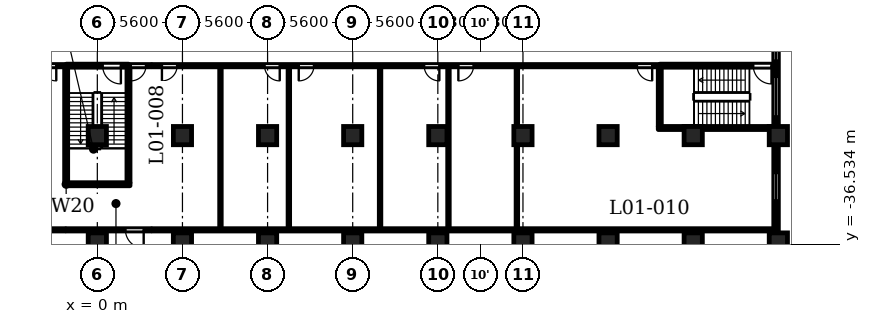
"""IFC4 building model, lengths in metres.
Left out: names, types, materials, properties, quantities, classifications, styles, units other than length and angle.
Written with IfcOpenShell. Run it as: python <this file> out.ifc"""

import sys

from ifc_helpers import new_model, si_unit, direction, frame, frame_2d, origin, origin_2d, place, context, subcontext, project, spatial, rectangle, circle, extrude, element, fill, save


model = new_model("IFC4")
c1 = context("Model", 3, precision=1e-05, world=origin(), true_north=direction((0.0, 1.0)))
c2 = subcontext(c1, "Body", "Model", "MODEL_VIEW")
j1 = project(units=[si_unit("LENGTHUNIT", "METRE"), si_unit("PLANEANGLEUNIT", "RADIAN")], contexts=[c1])
p1 = place(None, origin())
s1 = spatial("IfcSite", under=j1, at=p1, CompositionType="ELEMENT")
p2 = place(p1, origin())
s2 = spatial("IfcBuilding", under=s1, at=p2, CompositionType="ELEMENT")
p3 = place(p2, frame((0.0, 0.0, 6.5)))
s3 = spatial("IfcBuildingStorey", under=s2, at=p3, CompositionType="ELEMENT", Elevation=6.5)
for number, where, z_axis, x_axis in (
    (1, (0.0, -29.4, 0.0), (0.0, 0.0, 1.0), (1.0, 0.0, 0.0)),
    (2, (5.6, -29.4, 0.0), (0.0, 0.0, 1.0), (1.0, 0.0, 0.0)),
    (3, (11.2, -29.4, 0.0), (0.0, 0.0, 1.0), (1.0, 0.0, 0.0)),
    (4, (16.8, -29.4, 0.0), (0.0, 0.0, 1.0), (1.0, 0.0, 0.0)),
    (5, (22.4, -29.4, 0.0), (0.0, 0.0, 1.0), (1.0, 0.0, 0.0)),
    (6, (28.0, -29.4, 0.0), (0.0, 0.0, 1.0), (1.0, 0.0, 0.0)),
    (7, (33.6, -29.4, 0.0), (0.0, 0.0, 1.0), (1.0, 0.0, 0.0)),
    (8, (39.2, -29.4, 0.0), (0.0, 0.0, 1.0), (1.0, 0.0, 0.0)),
    (9, (44.8, -29.4, 0.0), (0.0, 0.0, 1.0), (1.0, 0.0, 0.0)),
    (10, (0.0, -36.4, 0.0), (0.0, 0.0, 1.0), (1.0, 0.0, 0.0)),
    (11, (5.6, -36.4, 0.0), (0.0, 0.0, 1.0), (1.0, 0.0, 0.0)),
    (12, (11.2, -36.4, 0.0), (0.0, 0.0, 1.0), (1.0, 0.0, 0.0)),
    (13, (16.8, -36.4, 0.0), (0.0, 0.0, 1.0), (1.0, 0.0, 0.0)),
    (14, (22.4, -36.4, 0.0), (0.0, 0.0, 1.0), (1.0, 0.0, 0.0)),
    (15, (28.0, -36.4, 0.0), (0.0, 0.0, 1.0), (1.0, 0.0, 0.0)),
    (16, (33.6, -36.4, 0.0), (0.0, 0.0, 1.0), (1.0, 0.0, 0.0)),
    (17, (39.2, -36.4, 0.0), (0.0, 0.0, 1.0), (1.0, 0.0, 0.0)),
    (18, (44.8, -36.4, 0.0), (0.0, 0.0, 1.0), (1.0, 0.0, 0.0)),
):
    element("IfcColumn", number, at=place(p3, frame(where, z_axis=z_axis, x_axis=x_axis)), inside=s3, PredefinedType="COLUMN", context=c2, shape_type="SweptSolid", body=[
        extrude(circle(Radius=0.6, at=origin_2d()), origin(), (0.0, 0.0, 1.0), 4.8),
    ])
p4 = place(p3, frame((44.65, -35.8, 0.0), z_axis=(0.0, 0.0, 1.0), x_axis=(0.0, 1.0, 0.0)))
e19 = element("IfcWall", 19, at=p4, inside=s3, PredefinedType="SOLIDWALL", context=c2, shape_type="SweptSolid", body=[
    extrude(rectangle(XDim=5.8, YDim=0.3, at=frame_2d((2.9, 0.0))), origin(), (0.0, 0.0, 1.0), 3.65),
])
p5 = place(p4, frame((2.137, 0.0, 0.9)))
e20 = element("IfcOpeningElement", 20, at=p5, cuts=e19, PredefinedType="OPENING", context=c2, shape_type="SweptSolid", body=[
    extrude(rectangle(XDim=1.8, YDim=1.25, at=frame_2d((0.9, 0.625))), frame((0.0, 0.16, 0.0), z_axis=(0.0, -1.0, 0.0), x_axis=(1.0, 0.0, 0.0)), (0.0, 0.0, 1.0), 0.32),
])
p6 = place(p3, frame((44.65, -28.8, 0.0), z_axis=(0.0, 0.0, 1.0), x_axis=(0.0, 1.0, 0.0)))
e21 = element("IfcWall", 21, at=p6, inside=s3, PredefinedType="SOLIDWALL", context=c2, shape_type="SweptSolid", body=[
    extrude(rectangle(XDim=5.8, YDim=0.3, at=frame_2d((2.9, 0.0))), origin(), (0.0, 0.0, 1.0), 3.65),
])
p7 = place(p6, frame((0.663, 0.0, 0.9)))
e22 = element("IfcOpeningElement", 22, at=p7, cuts=e21, PredefinedType="OPENING", context=c2, shape_type="SweptSolid", body=[
    extrude(rectangle(XDim=2.6, YDim=1.25, at=frame_2d((1.3, 0.625))), frame((0.0, 0.16, 0.0), z_axis=(0.0, -1.0, 0.0), x_axis=(1.0, 0.0, 0.0)), (0.0, 0.0, 1.0), 0.32),
])
p8 = place(p6, frame((4.337, 0.0, 0.6)))
e23 = element("IfcOpeningElement", 23, at=p8, cuts=e21, PredefinedType="OPENING", context=c2, shape_type="SweptSolid", body=[
    extrude(rectangle(XDim=1.2, YDim=1.55, at=frame_2d((0.6, 0.775))), frame((0.0, 0.16, 0.0), z_axis=(0.0, -1.0, 0.0), x_axis=(1.0, 0.0, 0.0)), (0.0, 0.0, 1.0), 0.32),
])
p9 = place(p3, frame((-44.48, -35.6, 0.0), z_axis=(0.0, 0.0, 1.0), x_axis=(1.0, 0.0, 0.0)))
e24 = element("IfcWall", 24, at=p9, inside=s3, PredefinedType="PARTITIONING", context=c2, shape_type="SweptSolid", body=[
    extrude(rectangle(XDim=42.38, YDim=0.15, at=frame_2d((21.19, 0.0))), origin(), (0.0, 0.0, 1.0), 4.45),
])
p10 = place(p3, frame((-2.05, -35.6, 0.0), z_axis=(0.0, 0.0, 1.0), x_axis=(1.0, 0.0, 0.0)))
e25 = element("IfcWall", 25, at=p10, inside=s3, PredefinedType="PARTITIONING", context=c2, shape_type="SweptSolid", body=[
    extrude(rectangle(XDim=5.6, YDim=0.15, at=frame_2d((2.8, 0.0))), origin(), (0.0, 0.0, 1.0), 4.45),
])
p11 = place(p10, frame((3.9, 0.0, 0.0)))
e26 = element("IfcOpeningElement", 26, at=p11, cuts=e25, PredefinedType="OPENING", context=c2, shape_type="SweptSolid", body=[
    extrude(rectangle(XDim=1.2, YDim=2.1, at=frame_2d((0.6, 1.05))), frame((0.0, 0.085, 0.0), z_axis=(0.0, -1.0, 0.0), x_axis=(1.0, 0.0, 0.0)), (0.0, 0.0, 1.0), 0.17),
])
p12 = place(p3, frame((3.6, -35.6, 0.0), z_axis=(0.0, 0.0, 1.0), x_axis=(1.0, 0.0, 0.0)))
e27 = element("IfcWall", 27, at=p12, inside=s3, PredefinedType="PARTITIONING", context=c2, shape_type="SweptSolid", body=[
    extrude(rectangle(XDim=40.88, YDim=0.15, at=frame_2d((20.44, 0.0))), origin(), (0.0, 0.0, 1.0), 4.45),
])
p13 = place(p3, frame((-2.05, -32.6, 0.0), z_axis=(0.0, 0.0, 1.0), x_axis=(1.0, 0.0, 0.0)))
e28 = element("IfcWall", 28, at=p13, inside=s3, PredefinedType="SHEAR", context=c2, shape_type="SweptSolid", body=[
    extrude(rectangle(XDim=4.2, YDim=0.2, at=frame_2d((2.1, 0.0))), origin(), (0.0, 0.0, 1.0), 4.45),
])
p14 = place(p3, frame((36.9, -28.9, 0.0), z_axis=(0.0, 0.0, 1.0), x_axis=(1.0, 0.0, 0.0)))
e29 = element("IfcWall", 29, at=p14, inside=s3, PredefinedType="SHEAR", context=c2, shape_type="SweptSolid", body=[
    extrude(rectangle(XDim=7.81, YDim=0.2, at=frame_2d((3.905, 0.0))), origin(), (0.0, 0.0, 1.0), 4.45),
])
p15 = place(p3, frame((-37.0, -24.8, 0.0), z_axis=(0.0, 0.0, 1.0), x_axis=(1.0, 0.0, 0.0)))
e30 = element("IfcWall", 30, at=p15, inside=s3, PredefinedType="PARTITIONING", context=c2, shape_type="SweptSolid", body=[
    extrude(rectangle(XDim=34.9, YDim=0.15, at=frame_2d((17.45, 0.0))), origin(), (0.0, 0.0, 1.0), 4.45),
])
p16 = place(p15, frame((0.65, 0.0, 0.0)))
e31 = element("IfcOpeningElement", 31, at=p16, cuts=e30, PredefinedType="OPENING", context=c2, shape_type="SweptSolid", body=[
    extrude(rectangle(XDim=1.0, YDim=2.1, at=frame_2d((0.5, 1.05))), frame((0.0, 0.085, 0.0), z_axis=(0.0, -1.0, 0.0), x_axis=(1.0, 0.0, 0.0)), (0.0, 0.0, 1.0), 0.17),
])
p17 = place(p15, frame((5.8, 0.0, 0.0)))
e32 = element("IfcOpeningElement", 32, at=p17, cuts=e30, PredefinedType="OPENING", context=c2, shape_type="SweptSolid", body=[
    extrude(rectangle(XDim=1.0, YDim=2.1, at=frame_2d((0.5, 1.05))), frame((0.0, 0.085, 0.0), z_axis=(0.0, -1.0, 0.0), x_axis=(1.0, 0.0, 0.0)), (0.0, 0.0, 1.0), 0.17),
])
p18 = place(p15, frame((8.05, 0.0, 0.0)))
e33 = element("IfcOpeningElement", 33, at=p18, cuts=e30, PredefinedType="OPENING", context=c2, shape_type="SweptSolid", body=[
    extrude(rectangle(XDim=1.0, YDim=2.1, at=frame_2d((0.5, 1.05))), frame((0.0, 0.085, 0.0), z_axis=(0.0, -1.0, 0.0), x_axis=(1.0, 0.0, 0.0)), (0.0, 0.0, 1.0), 0.17),
])
p19 = place(p15, frame((13.8, 0.0, 0.0)))
e34 = element("IfcOpeningElement", 34, at=p19, cuts=e30, PredefinedType="OPENING", context=c2, shape_type="SweptSolid", body=[
    extrude(rectangle(XDim=1.0, YDim=2.1, at=frame_2d((0.5, 1.05))), frame((0.0, 0.085, 0.0), z_axis=(0.0, -1.0, 0.0), x_axis=(1.0, 0.0, 0.0)), (0.0, 0.0, 1.0), 0.17),
])
p20 = place(p15, frame((16.05, 0.0, 0.0)))
e35 = element("IfcOpeningElement", 35, at=p20, cuts=e30, PredefinedType="OPENING", context=c2, shape_type="SweptSolid", body=[
    extrude(rectangle(XDim=1.0, YDim=2.1, at=frame_2d((0.5, 1.05))), frame((0.0, 0.085, 0.0), z_axis=(0.0, -1.0, 0.0), x_axis=(1.0, 0.0, 0.0)), (0.0, 0.0, 1.0), 0.17),
])
p21 = place(p15, frame((33.3, 0.0, 0.0)))
e36 = element("IfcOpeningElement", 36, at=p21, cuts=e30, PredefinedType="OPENING", context=c2, shape_type="SweptSolid", body=[
    extrude(rectangle(XDim=1.0, YDim=2.1, at=frame_2d((0.5, 1.05))), frame((0.0, 0.085, 0.0), z_axis=(0.0, -1.0, 0.0), x_axis=(1.0, 0.0, 0.0)), (0.0, 0.0, 1.0), 0.17),
])
p22 = place(p3, frame((2.05, -24.8, 0.0), z_axis=(0.0, 0.0, 1.0), x_axis=(1.0, 0.0, 0.0)))
e37 = element("IfcWall", 37, at=p22, inside=s3, PredefinedType="PARTITIONING", context=c2, shape_type="SweptSolid", body=[
    extrude(rectangle(XDim=1.5, YDim=0.15, at=frame_2d((0.75, 0.0))), origin(), (0.0, 0.0, 1.0), 4.45),
])
p23 = place(p22, frame((0.15, 0.0, 0.0)))
e38 = element("IfcOpeningElement", 38, at=p23, cuts=e37, PredefinedType="OPENING", context=c2, shape_type="SweptSolid", body=[
    extrude(rectangle(XDim=1.0, YDim=2.1, at=frame_2d((0.5, 1.05))), frame((0.0, 0.085, 0.0), z_axis=(0.0, -1.0, 0.0), x_axis=(1.0, 0.0, 0.0)), (0.0, 0.0, 1.0), 0.17),
])
p24 = place(p3, frame((3.6, -24.8, 0.0), z_axis=(0.0, 0.0, 1.0), x_axis=(1.0, 0.0, 0.0)))
e39 = element("IfcWall", 39, at=p24, inside=s3, PredefinedType="PARTITIONING", context=c2, shape_type="SweptSolid", body=[
    extrude(rectangle(XDim=33.4, YDim=0.15, at=frame_2d((16.7, 0.0))), origin(), (0.0, 0.0, 1.0), 4.45),
])
p25 = place(p24, frame((0.65, 0.0, 0.0)))
e40 = element("IfcOpeningElement", 40, at=p25, cuts=e39, PredefinedType="OPENING", context=c2, shape_type="SweptSolid", body=[
    extrude(rectangle(XDim=1.0, YDim=2.1, at=frame_2d((0.5, 1.05))), frame((0.0, 0.085, 0.0), z_axis=(0.0, -1.0, 0.0), x_axis=(1.0, 0.0, 0.0)), (0.0, 0.0, 1.0), 0.17),
])
p26 = place(p24, frame((7.4, 0.0, 0.0)))
e41 = element("IfcOpeningElement", 41, at=p26, cuts=e39, PredefinedType="OPENING", context=c2, shape_type="SweptSolid", body=[
    extrude(rectangle(XDim=1.0, YDim=2.1, at=frame_2d((0.5, 1.05))), frame((0.0, 0.085, 0.0), z_axis=(0.0, -1.0, 0.0), x_axis=(1.0, 0.0, 0.0)), (0.0, 0.0, 1.0), 0.17),
])
p27 = place(p24, frame((9.65, 0.0, 0.0)))
e42 = element("IfcOpeningElement", 42, at=p27, cuts=e39, PredefinedType="OPENING", context=c2, shape_type="SweptSolid", body=[
    extrude(rectangle(XDim=1.0, YDim=2.1, at=frame_2d((0.5, 1.05))), frame((0.0, 0.085, 0.0), z_axis=(0.0, -1.0, 0.0), x_axis=(1.0, 0.0, 0.0)), (0.0, 0.0, 1.0), 0.17),
])
p28 = place(p24, frame((17.9, 0.0, 0.0)))
e43 = element("IfcOpeningElement", 43, at=p28, cuts=e39, PredefinedType="OPENING", context=c2, shape_type="SweptSolid", body=[
    extrude(rectangle(XDim=1.0, YDim=2.1, at=frame_2d((0.5, 1.05))), frame((0.0, 0.085, 0.0), z_axis=(0.0, -1.0, 0.0), x_axis=(1.0, 0.0, 0.0)), (0.0, 0.0, 1.0), 0.17),
])
p29 = place(p24, frame((20.15, 0.0, 0.0)))
e44 = element("IfcOpeningElement", 44, at=p29, cuts=e39, PredefinedType="OPENING", context=c2, shape_type="SweptSolid", body=[
    extrude(rectangle(XDim=1.0, YDim=2.1, at=frame_2d((0.5, 1.05))), frame((0.0, 0.085, 0.0), z_axis=(0.0, -1.0, 0.0), x_axis=(1.0, 0.0, 0.0)), (0.0, 0.0, 1.0), 0.17),
])
p30 = place(p24, frame((31.9, 0.0, 0.0)))
e45 = element("IfcOpeningElement", 45, at=p30, cuts=e39, PredefinedType="OPENING", context=c2, shape_type="SweptSolid", body=[
    extrude(rectangle(XDim=1.0, YDim=2.1, at=frame_2d((0.5, 1.05))), frame((0.0, 0.085, 0.0), z_axis=(0.0, -1.0, 0.0), x_axis=(1.0, 0.0, 0.0)), (0.0, 0.0, 1.0), 0.17),
])
p31 = place(p3, frame((-2.05, -24.8, 0.0), z_axis=(0.0, 0.0, 1.0), x_axis=(1.0, 0.0, 0.0)))
e46 = element("IfcWall", 46, at=p31, inside=s3, PredefinedType="SHEAR", context=c2, shape_type="SweptSolid", body=[
    extrude(rectangle(XDim=4.1, YDim=0.2, at=frame_2d((2.05, 0.0))), origin(), (0.0, 0.0, 1.0), 4.45),
])
p32 = place(p31, frame((2.4, 0.0, 0.0)))
e47 = element("IfcOpeningElement", 47, at=p32, cuts=e46, PredefinedType="OPENING", context=c2, shape_type="SweptSolid", body=[
    extrude(rectangle(XDim=1.2, YDim=2.1, at=frame_2d((0.6, 1.05))), frame((0.0, 0.11, 0.0), z_axis=(0.0, -1.0, 0.0), x_axis=(1.0, 0.0, 0.0)), (0.0, 0.0, 1.0), 0.22),
])
p33 = place(p3, frame((37.0, -24.8, 0.0), z_axis=(0.0, 0.0, 1.0), x_axis=(1.0, 0.0, 0.0)))
e48 = element("IfcWall", 48, at=p33, inside=s3, PredefinedType="SHEAR", context=c2, shape_type="SweptSolid", body=[
    extrude(rectangle(XDim=7.71, YDim=0.2, at=frame_2d((3.855, 0.0))), origin(), (0.0, 0.0, 1.0), 4.45),
])
p34 = place(p33, frame((6.15, 0.0, 0.0)))
e49 = element("IfcOpeningElement", 49, at=p34, cuts=e48, PredefinedType="OPENING", context=c2, shape_type="SweptSolid", body=[
    extrude(rectangle(XDim=1.2, YDim=2.1, at=frame_2d((0.6, 1.05))), frame((0.0, 0.11, 0.0), z_axis=(0.0, -1.0, 0.0), x_axis=(1.0, 0.0, 0.0)), (0.0, 0.0, 1.0), 0.22),
])
p35 = place(p3, frame((2.05, -32.5, 0.0), z_axis=(0.0, 0.0, 1.0), x_axis=(0.0, 1.0, 0.0)))
e50 = element("IfcWall", 50, at=p35, inside=s3, PredefinedType="SHEAR", context=c2, shape_type="SweptSolid", body=[
    extrude(rectangle(XDim=7.625, YDim=0.2, at=frame_2d((3.812, 0.0))), origin(), (0.0, 0.0, 1.0), 4.45),
])
for number, where, z_axis, x_axis in (
    (51, (8.1, -35.525, 0.0), (0.0, 0.0, 1.0), (0.0, 1.0, 0.0)),
    (52, (12.6, -35.525, 0.0), (0.0, 0.0, 1.0), (0.0, 1.0, 0.0)),
    (53, (18.6, -35.525, 0.0), (0.0, 0.0, 1.0), (0.0, 1.0, 0.0)),
    (54, (23.1, -35.525, 0.0), (0.0, 0.0, 1.0), (0.0, 1.0, 0.0)),
    (55, (27.6, -35.525, 0.0), (0.0, 0.0, 1.0), (0.0, 1.0, 0.0)),
):
    element("IfcWall", number, at=place(p3, frame(where, z_axis=z_axis, x_axis=x_axis)), inside=s3, PredefinedType="PARTITIONING", context=c2, shape_type="SweptSolid", body=[
        extrude(rectangle(XDim=10.65, YDim=0.1, at=frame_2d((5.325, 0.0))), origin(), (0.0, 0.0, 1.0), 4.45),
    ])
p36 = place(p3, frame((37.0, -28.8, 0.0), z_axis=(0.0, 0.0, 1.0), x_axis=(0.0, 1.0, 0.0)))
e56 = element("IfcWall", 56, at=p36, inside=s3, PredefinedType="SHEAR", context=c2, shape_type="SweptSolid", body=[
    extrude(rectangle(XDim=3.925, YDim=0.2, at=frame_2d((1.962, 0.0))), origin(), (0.0, 0.0, 1.0), 4.45),
])
p37 = place(p3, frame((-2.05, -32.5, 0.0), z_axis=(0.0, 0.0, 1.0), x_axis=(0.0, 1.0, 0.0)))
e57 = element("IfcWall", 57, at=p37, inside=s3, PredefinedType="SHEAR", context=c2, shape_type="SweptSolid", body=[
    extrude(rectangle(XDim=7.6, YDim=0.2, at=frame_2d((3.8, 0.0))), origin(), (0.0, 0.0, 1.0), 4.45),
])
p38 = place(p34, origin())
e58 = element("IfcDoor", 58, at=p38, inside=s3, OperationType="SINGLE_SWING_RIGHT", PredefinedType="DOOR", context=c2, shape_type="SweptSolid", body=[
    extrude(rectangle(XDim=1.2, YDim=2.1, at=frame_2d((0.6, 1.05))), frame((0.0, 0.025, 0.0), z_axis=(0.0, -1.0, 0.0), x_axis=(1.0, 0.0, 0.0)), (0.0, 0.0, 1.0), 0.05),
])
fill(e49, e58)
p39 = place(p32, origin())
e59 = element("IfcDoor", 59, at=p39, inside=s3, OperationType="SINGLE_SWING_RIGHT", PredefinedType="DOOR", context=c2, shape_type="SweptSolid", body=[
    extrude(rectangle(XDim=1.2, YDim=2.1, at=frame_2d((0.6, 1.05))), frame((0.0, 0.025, 0.0), z_axis=(0.0, -1.0, 0.0), x_axis=(1.0, 0.0, 0.0)), (0.0, 0.0, 1.0), 0.05),
])
fill(e47, e59)
p40 = place(p23, origin())
e60 = element("IfcDoor", 60, at=p40, inside=s3, OperationType="SINGLE_SWING_LEFT", PredefinedType="DOOR", context=c2, shape_type="SweptSolid", body=[
    extrude(rectangle(XDim=1.0, YDim=2.1, at=frame_2d((0.5, 1.05))), frame((0.0, 0.025, 0.0), z_axis=(0.0, -1.0, 0.0), x_axis=(1.0, 0.0, 0.0)), (0.0, 0.0, 1.0), 0.05),
])
fill(e38, e60)
p41 = place(p11, origin())
e61 = element("IfcDoor", 61, at=p41, inside=s3, OperationType="SINGLE_SWING_RIGHT", PredefinedType="DOOR", context=c2, shape_type="SweptSolid", body=[
    extrude(rectangle(XDim=1.2, YDim=2.1, at=frame_2d((0.6, 1.05))), frame((0.0, 0.025, 0.0), z_axis=(0.0, -1.0, 0.0), x_axis=(1.0, 0.0, 0.0)), (0.0, 0.0, 1.0), 0.05),
])
fill(e26, e61)
p42 = place(p21, origin())
e62 = element("IfcDoor", 62, at=p42, inside=s3, OperationType="SINGLE_SWING_RIGHT", PredefinedType="DOOR", context=c2, shape_type="SweptSolid", body=[
    extrude(rectangle(XDim=1.0, YDim=2.1, at=frame_2d((0.5, 1.05))), frame((0.0, 0.025, 0.0), z_axis=(0.0, -1.0, 0.0), x_axis=(1.0, 0.0, 0.0)), (0.0, 0.0, 1.0), 0.05),
])
fill(e36, e62)
p43 = place(p25, origin())
e63 = element("IfcDoor", 63, at=p43, inside=s3, OperationType="SINGLE_SWING_LEFT", PredefinedType="DOOR", context=c2, shape_type="SweptSolid", body=[
    extrude(rectangle(XDim=1.0, YDim=2.1, at=frame_2d((0.5, 1.05))), frame((0.0, 0.025, 0.0), z_axis=(0.0, -1.0, 0.0), x_axis=(1.0, 0.0, 0.0)), (0.0, 0.0, 1.0), 0.05),
])
fill(e40, e63)
p44 = place(p26, origin())
e64 = element("IfcDoor", 64, at=p44, inside=s3, OperationType="SINGLE_SWING_RIGHT", PredefinedType="DOOR", context=c2, shape_type="SweptSolid", body=[
    extrude(rectangle(XDim=1.0, YDim=2.1, at=frame_2d((0.5, 1.05))), frame((0.0, 0.025, 0.0), z_axis=(0.0, -1.0, 0.0), x_axis=(1.0, 0.0, 0.0)), (0.0, 0.0, 1.0), 0.05),
])
fill(e41, e64)
p45 = place(p27, origin())
e65 = element("IfcDoor", 65, at=p45, inside=s3, OperationType="SINGLE_SWING_LEFT", PredefinedType="DOOR", context=c2, shape_type="SweptSolid", body=[
    extrude(rectangle(XDim=1.0, YDim=2.1, at=frame_2d((0.5, 1.05))), frame((0.0, 0.025, 0.0), z_axis=(0.0, -1.0, 0.0), x_axis=(1.0, 0.0, 0.0)), (0.0, 0.0, 1.0), 0.05),
])
fill(e42, e65)
p46 = place(p28, origin())
e66 = element("IfcDoor", 66, at=p46, inside=s3, OperationType="SINGLE_SWING_RIGHT", PredefinedType="DOOR", context=c2, shape_type="SweptSolid", body=[
    extrude(rectangle(XDim=1.0, YDim=2.1, at=frame_2d((0.5, 1.05))), frame((0.0, 0.025, 0.0), z_axis=(0.0, -1.0, 0.0), x_axis=(1.0, 0.0, 0.0)), (0.0, 0.0, 1.0), 0.05),
])
fill(e43, e66)
p47 = place(p29, origin())
e67 = element("IfcDoor", 67, at=p47, inside=s3, OperationType="SINGLE_SWING_LEFT", PredefinedType="DOOR", context=c2, shape_type="SweptSolid", body=[
    extrude(rectangle(XDim=1.0, YDim=2.1, at=frame_2d((0.5, 1.05))), frame((0.0, 0.025, 0.0), z_axis=(0.0, -1.0, 0.0), x_axis=(1.0, 0.0, 0.0)), (0.0, 0.0, 1.0), 0.05),
])
fill(e44, e67)
p48 = place(p30, origin())
e68 = element("IfcDoor", 68, at=p48, inside=s3, OperationType="SINGLE_SWING_RIGHT", PredefinedType="DOOR", context=c2, shape_type="SweptSolid", body=[
    extrude(rectangle(XDim=1.0, YDim=2.1, at=frame_2d((0.5, 1.05))), frame((0.0, 0.025, 0.0), z_axis=(0.0, -1.0, 0.0), x_axis=(1.0, 0.0, 0.0)), (0.0, 0.0, 1.0), 0.05),
])
fill(e45, e68)
p49 = place(p5, origin())
e69 = element("IfcWindow", 69, at=p49, inside=s3, PartitioningType="SINGLE_PANEL", PredefinedType="WINDOW", context=c2, shape_type="SweptSolid", body=[
    extrude(rectangle(XDim=1.8, YDim=1.25, at=frame_2d((0.9, 0.625))), frame((0.0, 0.03, 0.0), z_axis=(0.0, -1.0, 0.0), x_axis=(1.0, 0.0, 0.0)), (0.0, 0.0, 1.0), 0.06),
])
fill(e20, e69)
p50 = place(p7, origin())
e70 = element("IfcWindow", 70, at=p50, inside=s3, PartitioningType="SINGLE_PANEL", PredefinedType="WINDOW", context=c2, shape_type="SweptSolid", body=[
    extrude(rectangle(XDim=2.6, YDim=1.25, at=frame_2d((1.3, 0.625))), frame((0.0, 0.03, 0.0), z_axis=(0.0, -1.0, 0.0), x_axis=(1.0, 0.0, 0.0)), (0.0, 0.0, 1.0), 0.06),
])
fill(e22, e70)
p51 = place(p8, origin())
e71 = element("IfcWindow", 71, at=p51, inside=s3, PartitioningType="SINGLE_PANEL", PredefinedType="WINDOW", context=c2, shape_type="SweptSolid", body=[
    extrude(rectangle(XDim=1.2, YDim=1.55, at=frame_2d((0.6, 0.775))), frame((0.0, 0.03, 0.0), z_axis=(0.0, -1.0, 0.0), x_axis=(1.0, 0.0, 0.0)), (0.0, 0.0, 1.0), 0.06),
])
fill(e23, e71)
save(model, sys.argv[1])
